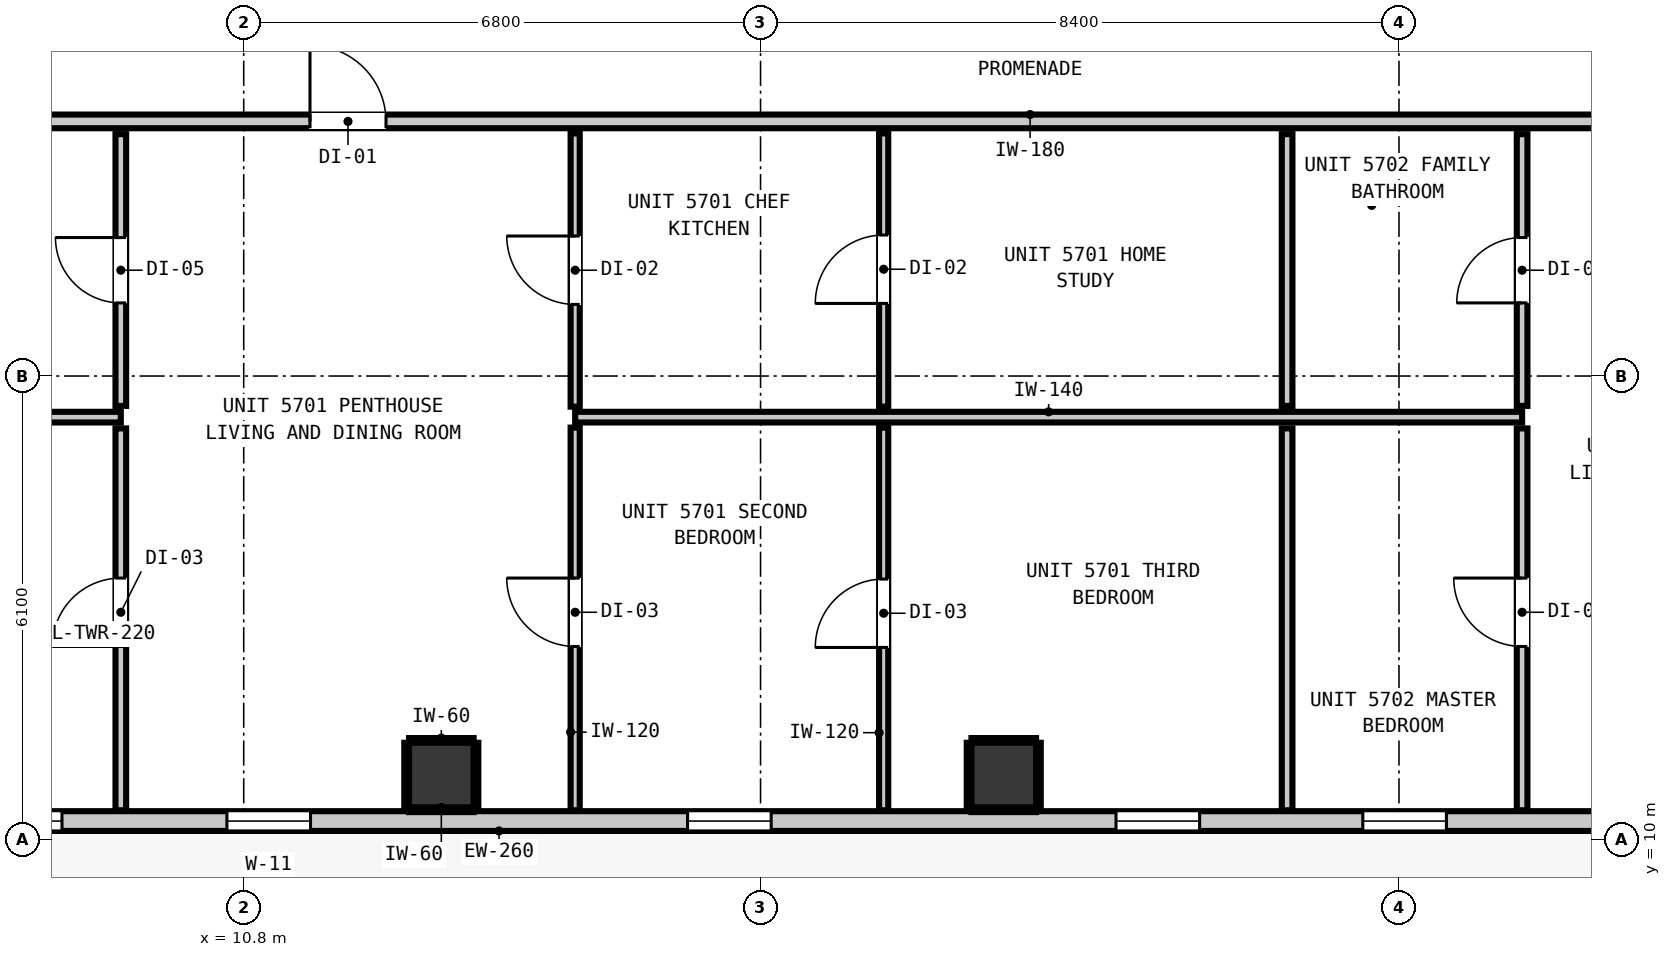
"""IFC4 building model, lengths in metres.
Left out: names, types, materials, properties, quantities, classifications, styles, units other than length and angle.
Written with IfcOpenShell. Run it as: python <this file> out.ifc"""

import sys

from ifc_helpers import new_model, si_unit, direction, frame, frame_2d, origin, origin_2d, place, context, subcontext, project, spatial, rectangle, extrude, element, fill, save


model = new_model("IFC4")
c1 = context("Model", 3, precision=1e-05, world=origin(), true_north=direction((0.0, 1.0)))
c2 = subcontext(c1, "Body", "Model", "MODEL_VIEW")
j1 = project(units=[si_unit("LENGTHUNIT", "METRE"), si_unit("PLANEANGLEUNIT", "RADIAN")], contexts=[c1])
p1 = place(None, origin())
s1 = spatial("IfcSite", under=j1, at=p1, CompositionType="ELEMENT")
p2 = place(p1, origin())
s2 = spatial("IfcBuilding", under=s1, at=p2, CompositionType="ELEMENT")
p3 = place(p2, frame((0.0, 0.0, 196.8)))
s3 = spatial("IfcBuildingStorey", under=s2, at=p3, CompositionType="ELEMENT", Elevation=196.8)
for number, where, z_axis, x_axis in (
    (1, (13.4, 10.85, 0.0), (0.0, 0.0, 1.0), (1.0, 0.0, 0.0)),
    (2, (20.8, 10.85, 0.0), (0.0, 0.0, 1.0), (1.0, 0.0, 0.0)),
):
    element("IfcColumn", number, at=place(p3, frame(where, z_axis=z_axis, x_axis=x_axis)), inside=s3, PredefinedType="COLUMN", context=c2, shape_type="SweptSolid", body=[
        extrude(rectangle(XDim=0.85, YDim=0.85, at=origin_2d()), origin(), (0.0, 0.0, 1.0), 3.32),
    ])
p4 = place(p3, frame((39.255, 10.245, 0.0), z_axis=(0.0, 0.0, 1.0), x_axis=(-1.0, 0.0, 0.0)))
e3 = element("IfcWall", 3, at=p4, inside=s3, PredefinedType="STANDARD", context=c2, shape_type="SweptSolid", body=[
    extrude(rectangle(XDim=32.71, YDim=0.26, at=frame_2d((16.355, 0.0))), origin(), (0.0, 0.0, 1.0), 3.1),
])
p5 = place(p4, frame((3.721, 0.0, 0.0)))
e4 = element("IfcOpeningElement", 4, at=p5, cuts=e3, PredefinedType="OPENING", context=c2, shape_type="SweptSolid", body=[
    extrude(rectangle(XDim=1.0, YDim=2.15, at=frame_2d((0.5, 1.075))), frame((0.0, 0.14, 0.0), z_axis=(0.0, -1.0, 0.0), x_axis=(1.0, 0.0, 0.0)), (0.0, 0.0, 1.0), 0.28),
])
p6 = place(p4, frame((27.576, 0.0, 0.85)))
e5 = element("IfcOpeningElement", 5, at=p6, cuts=e3, PredefinedType="OPENING", context=c2, shape_type="SweptSolid", body=[
    extrude(rectangle(XDim=1.1, YDim=2.05, at=frame_2d((0.55, 1.025))), frame((0.0, 0.14, 0.0), z_axis=(0.0, -1.0, 0.0), x_axis=(1.0, 0.0, 0.0)), (0.0, 0.0, 1.0), 0.28),
])
p7 = place(p4, frame((30.846, 0.0, 0.85)))
e6 = element("IfcOpeningElement", 6, at=p7, cuts=e3, PredefinedType="OPENING", context=c2, shape_type="SweptSolid", body=[
    extrude(rectangle(XDim=1.1, YDim=2.05, at=frame_2d((0.55, 1.025))), frame((0.0, 0.14, 0.0), z_axis=(0.0, -1.0, 0.0), x_axis=(1.0, 0.0, 0.0)), (0.0, 0.0, 1.0), 0.28),
])
p8 = place(p4, frame((21.515, 0.0, 0.85)))
e7 = element("IfcOpeningElement", 7, at=p8, cuts=e3, PredefinedType="OPENING", context=c2, shape_type="SweptSolid", body=[
    extrude(rectangle(XDim=1.1, YDim=2.05, at=frame_2d((0.55, 1.025))), frame((0.0, 0.14, 0.0), z_axis=(0.0, -1.0, 0.0), x_axis=(1.0, 0.0, 0.0)), (0.0, 0.0, 1.0), 0.28),
])
p9 = place(p4, frame((15.878, 0.0, 0.85)))
e8 = element("IfcOpeningElement", 8, at=p9, cuts=e3, PredefinedType="OPENING", context=c2, shape_type="SweptSolid", body=[
    extrude(rectangle(XDim=1.1, YDim=2.05, at=frame_2d((0.55, 1.025))), frame((0.0, 0.14, 0.0), z_axis=(0.0, -1.0, 0.0), x_axis=(1.0, 0.0, 0.0)), (0.0, 0.0, 1.0), 0.28),
])
p10 = place(p4, frame((7.632, 0.0, 0.85)))
e9 = element("IfcOpeningElement", 9, at=p10, cuts=e3, PredefinedType="OPENING", context=c2, shape_type="SweptSolid", body=[
    extrude(rectangle(XDim=1.1, YDim=2.05, at=frame_2d((0.55, 1.025))), frame((0.0, 0.14, 0.0), z_axis=(0.0, -1.0, 0.0), x_axis=(1.0, 0.0, 0.0)), (0.0, 0.0, 1.0), 0.28),
])
p11 = place(p4, frame((12.631, 0.0, 0.85)))
e10 = element("IfcOpeningElement", 10, at=p11, cuts=e3, PredefinedType="OPENING", context=c2, shape_type="SweptSolid", body=[
    extrude(rectangle(XDim=1.1, YDim=2.05, at=frame_2d((0.55, 1.025))), frame((0.0, 0.14, 0.0), z_axis=(0.0, -1.0, 0.0), x_axis=(1.0, 0.0, 0.0)), (0.0, 0.0, 1.0), 0.28),
])
p12 = place(p4, frame((5.177, 0.0, 0.85)))
e11 = element("IfcOpeningElement", 11, at=p12, cuts=e3, PredefinedType="OPENING", context=c2, shape_type="SweptSolid", body=[
    extrude(rectangle(XDim=1.1, YDim=2.05, at=frame_2d((0.55, 1.025))), frame((0.0, 0.14, 0.0), z_axis=(0.0, -1.0, 0.0), x_axis=(1.0, 0.0, 0.0)), (0.0, 0.0, 1.0), 0.28),
])
p13 = place(p4, frame((0.293, 0.0, 0.85)))
e12 = element("IfcOpeningElement", 12, at=p13, cuts=e3, PredefinedType="OPENING", context=c2, shape_type="SweptSolid", body=[
    extrude(rectangle(XDim=0.58, YDim=1.5, at=frame_2d((0.29, 0.75))), frame((0.0, 0.14, 0.0), z_axis=(0.0, -1.0, 0.0), x_axis=(1.0, 0.0, 0.0)), (0.0, 0.0, 1.0), 0.28),
])
p14 = place(p3, frame((4.587, 19.45, 0.0), z_axis=(0.0, 0.0, 1.0), x_axis=(1.0, 0.0, 0.0)))
e13 = element("IfcWall", 13, at=p14, inside=s3, PredefinedType="PARTITIONING", context=c2, shape_type="SweptSolid", body=[
    extrude(rectangle(XDim=36.626, YDim=0.18, at=frame_2d((18.313, 0.0))), origin(), (0.0, 0.0, 1.0), 3.1),
])
p15 = place(p14, frame((7.085, 0.0, 0.0)))
e14 = element("IfcOpeningElement", 14, at=p15, cuts=e13, PredefinedType="OPENING", context=c2, shape_type="SweptSolid", body=[
    extrude(rectangle(XDim=1.0, YDim=2.15, at=frame_2d((0.5, 1.075))), frame((0.0, 0.1, 0.0), z_axis=(0.0, -1.0, 0.0), x_axis=(1.0, 0.0, 0.0)), (0.0, 0.0, 1.0), 0.2),
])
p16 = place(p14, frame((25.034, 0.0, 0.0)))
e15 = element("IfcOpeningElement", 15, at=p16, cuts=e13, PredefinedType="OPENING", context=c2, shape_type="SweptSolid", body=[
    extrude(rectangle(XDim=1.0, YDim=2.15, at=frame_2d((0.5, 1.075))), frame((0.0, 0.1, 0.0), z_axis=(0.0, -1.0, 0.0), x_axis=(1.0, 0.0, 0.0)), (0.0, 0.0, 1.0), 0.2),
])
p17 = place(p3, frame((4.587, 15.559, 0.0), z_axis=(0.0, 0.0, 1.0), x_axis=(1.0, 0.0, 0.0)))
e16 = element("IfcWall", 16, at=p17, inside=s3, PredefinedType="PARTITIONING", context=c2, shape_type="SweptSolid", body=[
    extrude(rectangle(XDim=4.596, YDim=0.14, at=frame_2d((2.298, 0.0))), origin(), (0.0, 0.0, 1.0), 3.1),
])
p18 = place(p3, frame((15.161, 15.559, 0.0), z_axis=(0.0, 0.0, 1.0), x_axis=(1.0, 0.0, 0.0)))
e17 = element("IfcWall", 17, at=p18, inside=s3, PredefinedType="PARTITIONING", context=c2, shape_type="SweptSolid", body=[
    extrude(rectangle(XDim=12.459, YDim=0.14, at=frame_2d((6.229, 0.0))), origin(), (0.0, 0.0, 1.0), 3.1),
])
p19 = place(p3, frame((9.183, 10.387, 0.0), z_axis=(0.0, 0.0, 1.0), x_axis=(0.0, 1.0, 0.0)))
e18 = element("IfcWall", 18, at=p19, inside=s3, PredefinedType="PARTITIONING", context=c2, shape_type="SweptSolid", body=[
    extrude(rectangle(XDim=5.024, YDim=0.14, at=frame_2d((2.512, 0.0))), origin(), (0.0, 0.0, 1.0), 3.1),
])
p20 = place(p19, frame((2.155, 0.0, 0.0)))
e19 = element("IfcOpeningElement", 19, at=p20, cuts=e18, PredefinedType="OPENING", context=c2, shape_type="SweptSolid", body=[
    extrude(rectangle(XDim=0.9, YDim=2.1, at=frame_2d((0.45, 1.05))), frame((0.0, 0.08, 0.0), z_axis=(0.0, -1.0, 0.0), x_axis=(1.0, 0.0, 0.0)), (0.0, 0.0, 1.0), 0.16),
])
p21 = place(p3, frame((9.183, 15.707, 0.0), z_axis=(0.0, 0.0, 1.0), x_axis=(0.0, 1.0, 0.0)))
e20 = element("IfcWall", 20, at=p21, inside=s3, PredefinedType="PARTITIONING", context=c2, shape_type="SweptSolid", body=[
    extrude(rectangle(XDim=3.575, YDim=0.14, at=frame_2d((1.788, 0.0))), origin(), (0.0, 0.0, 1.0), 2.477),
])
p22 = place(p21, frame((1.355, 0.0, 0.0)))
e21 = element("IfcOpeningElement", 21, at=p22, cuts=e20, PredefinedType="OPENING", context=c2, shape_type="SweptSolid", body=[
    extrude(rectangle(XDim=0.86, YDim=2.02, at=frame_2d((0.43, 1.01))), frame((0.0, 0.08, 0.0), z_axis=(0.0, -1.0, 0.0), x_axis=(1.0, 0.0, 0.0)), (0.0, 0.0, 1.0), 0.16),
])
p23 = place(p3, frame((24.528, 10.387, 0.0), z_axis=(0.0, 0.0, 1.0), x_axis=(0.0, 1.0, 0.0)))
e22 = element("IfcWall", 22, at=p23, inside=s3, PredefinedType="PARTITIONING", context=c2, shape_type="SweptSolid", body=[
    extrude(rectangle(XDim=5.024, YDim=0.14, at=frame_2d((2.512, 0.0))), origin(), (0.0, 0.0, 1.0), 3.1),
])
p24 = place(p3, frame((24.528, 15.707, 0.0), z_axis=(0.0, 0.0, 1.0), x_axis=(0.0, 1.0, 0.0)))
e23 = element("IfcWall", 23, at=p24, inside=s3, PredefinedType="PARTITIONING", context=c2, shape_type="SweptSolid", body=[
    extrude(rectangle(XDim=3.575, YDim=0.14, at=frame_2d((1.788, 0.0))), origin(), (0.0, 0.0, 1.0), 3.1),
])
p25 = place(p3, frame((27.62, 10.387, 0.0), z_axis=(0.0, 0.0, 1.0), x_axis=(0.0, 1.0, 0.0)))
e24 = element("IfcWall", 24, at=p25, inside=s3, PredefinedType="PARTITIONING", context=c2, shape_type="SweptSolid", body=[
    extrude(rectangle(XDim=5.024, YDim=0.14, at=frame_2d((2.512, 0.0))), origin(), (0.0, 0.0, 1.0), 3.1),
])
p26 = place(p25, frame((2.155, 0.0, 0.0)))
e25 = element("IfcOpeningElement", 25, at=p26, cuts=e24, PredefinedType="OPENING", context=c2, shape_type="SweptSolid", body=[
    extrude(rectangle(XDim=0.9, YDim=2.1, at=frame_2d((0.45, 1.05))), frame((0.0, 0.08, 0.0), z_axis=(0.0, -1.0, 0.0), x_axis=(1.0, 0.0, 0.0)), (0.0, 0.0, 1.0), 0.16),
])
p27 = place(p3, frame((27.62, 15.707, 0.0), z_axis=(0.0, 0.0, 1.0), x_axis=(0.0, 1.0, 0.0)))
e26 = element("IfcWall", 26, at=p27, inside=s3, PredefinedType="PARTITIONING", context=c2, shape_type="SweptSolid", body=[
    extrude(rectangle(XDim=3.575, YDim=0.14, at=frame_2d((1.788, 0.0))), origin(), (0.0, 0.0, 1.0), 3.1),
])
p28 = place(p27, frame((1.355, 0.0, 0.0)))
e27 = element("IfcOpeningElement", 27, at=p28, cuts=e26, PredefinedType="OPENING", context=c2, shape_type="SweptSolid", body=[
    extrude(rectangle(XDim=0.86, YDim=2.02, at=frame_2d((0.43, 1.01))), frame((0.0, 0.08, 0.0), z_axis=(0.0, -1.0, 0.0), x_axis=(1.0, 0.0, 0.0)), (0.0, 0.0, 1.0), 0.16),
])
p29 = place(p3, frame((15.161, 10.387, 0.0), z_axis=(0.0, 0.0, 1.0), x_axis=(0.0, 1.0, 0.0)))
e28 = element("IfcWall", 28, at=p29, inside=s3, PredefinedType="PARTITIONING", context=c2, shape_type="SweptSolid", body=[
    extrude(rectangle(XDim=5.034, YDim=0.12, at=frame_2d((2.517, 0.0))), origin(), (0.0, 0.0, 1.0), 3.1),
])
p30 = place(p29, frame((2.155, 0.0, 0.0)))
e29 = element("IfcOpeningElement", 29, at=p30, cuts=e28, PredefinedType="OPENING", context=c2, shape_type="SweptSolid", body=[
    extrude(rectangle(XDim=0.9, YDim=2.1, at=frame_2d((0.45, 1.05))), frame((0.0, 0.07, 0.0), z_axis=(0.0, -1.0, 0.0), x_axis=(1.0, 0.0, 0.0)), (0.0, 0.0, 1.0), 0.14),
])
p31 = place(p3, frame((15.161, 15.697, 0.0), z_axis=(0.0, 0.0, 1.0), x_axis=(0.0, 1.0, 0.0)))
e30 = element("IfcWall", 30, at=p31, inside=s3, PredefinedType="PARTITIONING", context=c2, shape_type="SweptSolid", body=[
    extrude(rectangle(XDim=3.595, YDim=0.12, at=frame_2d((1.797, 0.0))), origin(), (0.0, 0.0, 1.0), 3.1),
])
p32 = place(p31, frame((1.345, 0.0, 0.0)))
e31 = element("IfcOpeningElement", 31, at=p32, cuts=e30, PredefinedType="OPENING", context=c2, shape_type="SweptSolid", body=[
    extrude(rectangle(XDim=0.9, YDim=2.1, at=frame_2d((0.45, 1.05))), frame((0.0, 0.07, 0.0), z_axis=(0.0, -1.0, 0.0), x_axis=(1.0, 0.0, 0.0)), (0.0, 0.0, 1.0), 0.14),
])
p33 = place(p3, frame((19.22, 10.387, 0.0), z_axis=(0.0, 0.0, 1.0), x_axis=(0.0, 1.0, 0.0)))
e32 = element("IfcWall", 32, at=p33, inside=s3, PredefinedType="PARTITIONING", context=c2, shape_type="SweptSolid", body=[
    extrude(rectangle(XDim=5.034, YDim=0.12, at=frame_2d((2.517, 0.0))), origin(), (0.0, 0.0, 1.0), 3.1),
])
p34 = place(p33, frame((2.142, 0.0, 0.0)))
e33 = element("IfcOpeningElement", 33, at=p34, cuts=e32, PredefinedType="OPENING", context=c2, shape_type="SweptSolid", body=[
    extrude(rectangle(XDim=0.9, YDim=2.1, at=frame_2d((0.45, 1.05))), frame((0.0, 0.07, 0.0), z_axis=(0.0, -1.0, 0.0), x_axis=(1.0, 0.0, 0.0)), (0.0, 0.0, 1.0), 0.14),
])
p35 = place(p3, frame((19.22, 15.697, 0.0), z_axis=(0.0, 0.0, 1.0), x_axis=(0.0, 1.0, 0.0)))
e34 = element("IfcWall", 34, at=p35, inside=s3, PredefinedType="PARTITIONING", context=c2, shape_type="SweptSolid", body=[
    extrude(rectangle(XDim=3.595, YDim=0.12, at=frame_2d((1.797, 0.0))), origin(), (0.0, 0.0, 1.0), 3.1),
])
p36 = place(p35, frame((1.358, 0.0, 0.0)))
e35 = element("IfcOpeningElement", 35, at=p36, cuts=e34, PredefinedType="OPENING", context=c2, shape_type="SweptSolid", body=[
    extrude(rectangle(XDim=0.9, YDim=2.1, at=frame_2d((0.45, 1.05))), frame((0.0, 0.07, 0.0), z_axis=(0.0, -1.0, 0.0), x_axis=(1.0, 0.0, 0.0)), (0.0, 0.0, 1.0), 0.14),
])
for number, where, z_axis, x_axis in (
    (36, (12.975, 10.393, 0.0), (0.0, 0.0, 1.0), (1.0, 0.0, 0.0)),
    (37, (12.975, 11.307, 0.0), (0.0, 0.0, 1.0), (1.0, 0.0, 0.0)),
    (38, (12.943, 10.425, 0.0), (0.0, 0.0, 1.0), (0.0, 1.0, 0.0)),
    (39, (13.857, 10.425, 0.0), (0.0, 0.0, 1.0), (0.0, 1.0, 0.0)),
):
    element("IfcWall", number, at=place(p3, frame(where, z_axis=z_axis, x_axis=x_axis)), inside=s3, PredefinedType="PARTITIONING", context=c2, shape_type="SweptSolid", body=[
        extrude(rectangle(XDim=0.85, YDim=0.06, at=frame_2d((0.425, 0.0))), origin(), (0.0, 0.0, 1.0), 1.45),
    ])
for number, where, z_axis, x_axis in (
    (40, (20.375, 10.393, 0.0), (0.0, 0.0, 1.0), (1.0, 0.0, 0.0)),
    (41, (20.375, 11.307, 0.0), (0.0, 0.0, 1.0), (1.0, 0.0, 0.0)),
):
    element("IfcWall", number, at=place(p3, frame(where, z_axis=z_axis, x_axis=x_axis)), inside=s3, PredefinedType="PARTITIONING", context=c2, shape_type="SweptSolid", body=[
        extrude(rectangle(XDim=0.85, YDim=0.06, at=frame_2d((0.425, 0.0))), origin(), (0.0, 0.0, 1.0), 1.45),
    ])
for number, where, z_axis, x_axis in (
    (42, (20.343, 10.425, 0.0), (0.0, 0.0, 1.0), (0.0, 1.0, 0.0)),
    (43, (21.257, 10.425, 0.0), (0.0, 0.0, 1.0), (0.0, 1.0, 0.0)),
):
    element("IfcWall", number, at=place(p3, frame(where, z_axis=z_axis, x_axis=x_axis)), inside=s3, PredefinedType="PARTITIONING", context=c2, shape_type="SweptSolid", body=[
        extrude(rectangle(XDim=0.85, YDim=0.06, at=frame_2d((0.425, 0.0))), origin(), (0.0, 0.0, 1.0), 1.45),
    ])
p37 = place(p6, origin())
e44 = element("IfcWindow", 44, at=p37, inside=s3, PartitioningType="SINGLE_PANEL", PredefinedType="WINDOW", context=c2, shape_type="SweptSolid", body=[
    extrude(rectangle(XDim=1.1, YDim=2.05, at=frame_2d((0.55, 1.025))), frame((0.0, 0.03, 0.0), z_axis=(0.0, -1.0, 0.0), x_axis=(1.0, 0.0, 0.0)), (0.0, 0.0, 1.0), 0.06),
])
fill(e5, e44)
p38 = place(p7, origin())
e45 = element("IfcWindow", 45, at=p38, inside=s3, PartitioningType="SINGLE_PANEL", PredefinedType="WINDOW", context=c2, shape_type="SweptSolid", body=[
    extrude(rectangle(XDim=1.1, YDim=2.05, at=frame_2d((0.55, 1.025))), frame((0.0, 0.03, 0.0), z_axis=(0.0, -1.0, 0.0), x_axis=(1.0, 0.0, 0.0)), (0.0, 0.0, 1.0), 0.06),
])
fill(e6, e45)
p39 = place(p8, origin())
e46 = element("IfcWindow", 46, at=p39, inside=s3, PartitioningType="SINGLE_PANEL", PredefinedType="WINDOW", context=c2, shape_type="SweptSolid", body=[
    extrude(rectangle(XDim=1.1, YDim=2.05, at=frame_2d((0.55, 1.025))), frame((0.0, 0.03, 0.0), z_axis=(0.0, -1.0, 0.0), x_axis=(1.0, 0.0, 0.0)), (0.0, 0.0, 1.0), 0.06),
])
fill(e7, e46)
p40 = place(p9, origin())
e47 = element("IfcWindow", 47, at=p40, inside=s3, PartitioningType="SINGLE_PANEL", PredefinedType="WINDOW", context=c2, shape_type="SweptSolid", body=[
    extrude(rectangle(XDim=1.1, YDim=2.05, at=frame_2d((0.55, 1.025))), frame((0.0, 0.03, 0.0), z_axis=(0.0, -1.0, 0.0), x_axis=(1.0, 0.0, 0.0)), (0.0, 0.0, 1.0), 0.06),
])
fill(e8, e47)
p41 = place(p11, origin())
e48 = element("IfcWindow", 48, at=p41, inside=s3, PartitioningType="SINGLE_PANEL", PredefinedType="WINDOW", context=c2, shape_type="SweptSolid", body=[
    extrude(rectangle(XDim=1.1, YDim=2.05, at=frame_2d((0.55, 1.025))), frame((0.0, 0.03, 0.0), z_axis=(0.0, -1.0, 0.0), x_axis=(1.0, 0.0, 0.0)), (0.0, 0.0, 1.0), 0.06),
])
fill(e10, e48)
p42 = place(p15, origin())
e49 = element("IfcDoor", 49, at=p42, inside=s3, OperationType="SINGLE_SWING_LEFT", PredefinedType="DOOR", context=c2, shape_type="SweptSolid", body=[
    extrude(rectangle(XDim=1.0, YDim=2.15, at=frame_2d((0.5, 1.075))), frame((0.0, 0.025, 0.0), z_axis=(0.0, -1.0, 0.0), x_axis=(1.0, 0.0, 0.0)), (0.0, 0.0, 1.0), 0.05),
])
fill(e14, e49)
p43 = place(p22, origin())
e50 = element("IfcDoor", 50, at=p43, inside=s3, OperationType="SINGLE_SWING_RIGHT", PredefinedType="DOOR", context=c2, shape_type="SweptSolid", body=[
    extrude(rectangle(XDim=0.86, YDim=2.02, at=frame_2d((0.43, 1.01))), frame((0.0, 0.025, 0.0), z_axis=(0.0, -1.0, 0.0), x_axis=(1.0, 0.0, 0.0)), (0.0, 0.0, 1.0), 0.05),
])
fill(e21, e50)
p44 = place(p20, origin())
e51 = element("IfcDoor", 51, at=p44, inside=s3, OperationType="SINGLE_SWING_LEFT", PredefinedType="DOOR", context=c2, shape_type="SweptSolid", body=[
    extrude(rectangle(XDim=0.9, YDim=2.1, at=frame_2d((0.45, 1.05))), frame((0.0, 0.025, 0.0), z_axis=(0.0, -1.0, 0.0), x_axis=(1.0, 0.0, 0.0)), (0.0, 0.0, 1.0), 0.05),
])
fill(e19, e51)
p45 = place(p32, origin())
e52 = element("IfcDoor", 52, at=p45, inside=s3, OperationType="SINGLE_SWING_RIGHT", PredefinedType="DOOR", context=c2, shape_type="SweptSolid", body=[
    extrude(rectangle(XDim=0.9, YDim=2.1, at=frame_2d((0.45, 1.05))), frame((0.0, 0.025, 0.0), z_axis=(0.0, -1.0, 0.0), x_axis=(1.0, 0.0, 0.0)), (0.0, 0.0, 1.0), 0.05),
])
fill(e31, e52)
p46 = place(p36, origin())
e53 = element("IfcDoor", 53, at=p46, inside=s3, OperationType="SINGLE_SWING_LEFT", PredefinedType="DOOR", context=c2, shape_type="SweptSolid", body=[
    extrude(rectangle(XDim=0.9, YDim=2.1, at=frame_2d((0.45, 1.05))), frame((0.0, 0.025, 0.0), z_axis=(0.0, -1.0, 0.0), x_axis=(1.0, 0.0, 0.0)), (0.0, 0.0, 1.0), 0.05),
])
fill(e35, e53)
p47 = place(p30, origin())
e54 = element("IfcDoor", 54, at=p47, inside=s3, OperationType="SINGLE_SWING_RIGHT", PredefinedType="DOOR", context=c2, shape_type="SweptSolid", body=[
    extrude(rectangle(XDim=0.9, YDim=2.1, at=frame_2d((0.45, 1.05))), frame((0.0, 0.025, 0.0), z_axis=(0.0, -1.0, 0.0), x_axis=(1.0, 0.0, 0.0)), (0.0, 0.0, 1.0), 0.05),
])
fill(e29, e54)
p48 = place(p34, origin())
e55 = element("IfcDoor", 55, at=p48, inside=s3, OperationType="SINGLE_SWING_LEFT", PredefinedType="DOOR", context=c2, shape_type="SweptSolid", body=[
    extrude(rectangle(XDim=0.9, YDim=2.1, at=frame_2d((0.45, 1.05))), frame((0.0, 0.025, 0.0), z_axis=(0.0, -1.0, 0.0), x_axis=(1.0, 0.0, 0.0)), (0.0, 0.0, 1.0), 0.05),
])
fill(e33, e55)
p49 = place(p28, origin())
e56 = element("IfcDoor", 56, at=p49, inside=s3, OperationType="SINGLE_SWING_LEFT", PredefinedType="DOOR", context=c2, shape_type="SweptSolid", body=[
    extrude(rectangle(XDim=0.86, YDim=2.02, at=frame_2d((0.43, 1.01))), frame((0.0, 0.025, 0.0), z_axis=(0.0, -1.0, 0.0), x_axis=(1.0, 0.0, 0.0)), (0.0, 0.0, 1.0), 0.05),
])
fill(e27, e56)
p50 = place(p26, origin())
e57 = element("IfcDoor", 57, at=p50, inside=s3, OperationType="SINGLE_SWING_RIGHT", PredefinedType="DOOR", context=c2, shape_type="SweptSolid", body=[
    extrude(rectangle(XDim=0.9, YDim=2.1, at=frame_2d((0.45, 1.05))), frame((0.0, 0.025, 0.0), z_axis=(0.0, -1.0, 0.0), x_axis=(1.0, 0.0, 0.0)), (0.0, 0.0, 1.0), 0.05),
])
fill(e25, e57)
save(model, sys.argv[1])
